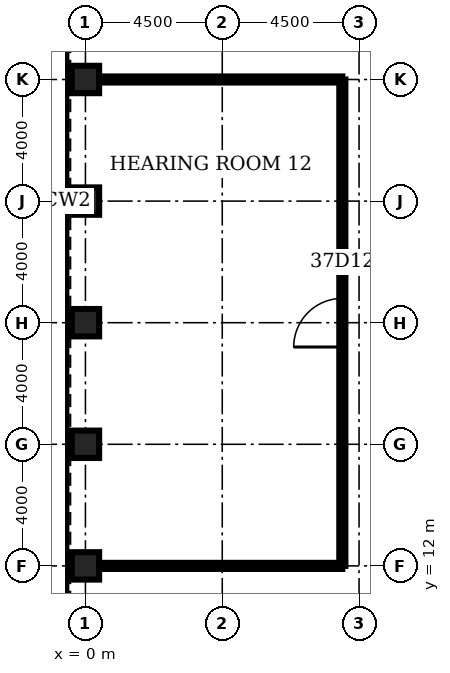
"""IFC4 building model, lengths in metres.
Left out: names, types, materials, properties, quantities, classifications, styles, units other than length and angle.
Written with IfcOpenShell. Run it as: python <this file> out.ifc"""

import sys

from ifc_helpers import new_model, si_unit, direction, frame, frame_2d, origin, origin_2d, place, context, subcontext, project, spatial, rectangle, hollow_rectangle, extrude, element, fill, save


model = new_model("IFC4")
c1 = context("Model", 3, precision=1e-05, world=origin(), true_north=direction((0.0, 1.0)))
c2 = subcontext(c1, "Body", "Model", "MODEL_VIEW")
j1 = project(units=[si_unit("LENGTHUNIT", "METRE"), si_unit("PLANEANGLEUNIT", "RADIAN")], contexts=[c1])
p1 = place(None, origin())
s1 = spatial("IfcSite", under=j1, at=p1, CompositionType="ELEMENT")
p2 = place(p1, origin())
s2 = spatial("IfcBuilding", under=s1, at=p2, CompositionType="ELEMENT")
p3 = place(p2, frame((0.0, 0.0, 167.7)))
s3 = spatial("IfcBuildingStorey", under=s2, at=p3, CompositionType="ELEMENT", Elevation=167.7)
for number, where, z_axis, x_axis in (
    (1, (0.0, 28.0, 0.0), (0.0, 0.0, 1.0), (1.0, 0.0, 0.0)),
    (2, (0.0, 24.0, 0.0), (0.0, 0.0, 1.0), (1.0, 0.0, 0.0)),
    (3, (0.0, 20.0, 0.0), (0.0, 0.0, 1.0), (1.0, 0.0, 0.0)),
    (4, (0.0, 16.0, 0.0), (0.0, 0.0, 1.0), (1.0, 0.0, 0.0)),
    (5, (0.0, 12.0, 0.0), (0.0, 0.0, 1.0), (1.0, 0.0, 0.0)),
):
    element("IfcColumn", number, at=place(p3, frame(where, z_axis=z_axis, x_axis=x_axis)), inside=s3, PredefinedType="COLUMN", context=c2, shape_type="SweptSolid", body=[
        extrude(hollow_rectangle(XDim=0.9, YDim=0.9, WallThickness=0.09, at=origin_2d()), origin(), (0.0, 0.0, 1.0), 4.2),
    ])
for number, where, z_axis, x_axis in (
    (6, (0.45, 12.0, 0.0), (0.0, 0.0, 1.0), (1.0, 0.0, 0.0)),
    (7, (0.45, 28.0, 0.0), (0.0, 0.0, 1.0), (1.0, 0.0, 0.0)),
):
    element("IfcWall", number, at=place(p3, frame(where, z_axis=z_axis, x_axis=x_axis)), inside=s3, PredefinedType="PARTITIONING", context=c2, shape_type="SweptSolid", body=[
        extrude(rectangle(XDim=8.0, YDim=0.2, at=frame_2d((4.0, 0.0))), origin(), (0.0, 0.0, 1.0), 3.0),
    ])
p4 = place(p3, frame((8.45, 12.0, 0.0), z_axis=(0.0, 0.0, 1.0), x_axis=(0.0, 1.0, 0.0)))
e8 = element("IfcWall", 8, at=p4, inside=s3, PredefinedType="PARTITIONING", context=c2, shape_type="SweptSolid", body=[
    extrude(rectangle(XDim=16.0, YDim=0.2, at=frame_2d((8.0, 0.0))), origin(), (0.0, 0.0, 1.0), 3.0),
])
p5 = place(p4, frame((7.2, 0.0, 0.0)))
e9 = element("IfcOpeningElement", 9, at=p5, cuts=e8, PredefinedType="OPENING", context=c2, shape_type="SweptSolid", body=[
    extrude(rectangle(XDim=1.6, YDim=2.1, at=frame_2d((0.8, 1.05))), frame((0.0, 0.11, 0.0), z_axis=(0.0, -1.0, 0.0), x_axis=(1.0, 0.0, 0.0)), (0.0, 0.0, 1.0), 0.22),
])
p6 = place(p5, origin())
e10 = element("IfcDoor", 10, at=p6, inside=s3, OperationType="SINGLE_SWING_LEFT", PredefinedType="DOOR", context=c2, shape_type="SweptSolid", body=[
    extrude(rectangle(XDim=1.6, YDim=2.1, at=frame_2d((0.8, 1.05))), frame((0.0, 0.025, 0.0), z_axis=(0.0, -1.0, 0.0), x_axis=(1.0, 0.0, 0.0)), (0.0, 0.0, 1.0), 0.05),
])
fill(e9, e10)
save(model, sys.argv[1])
